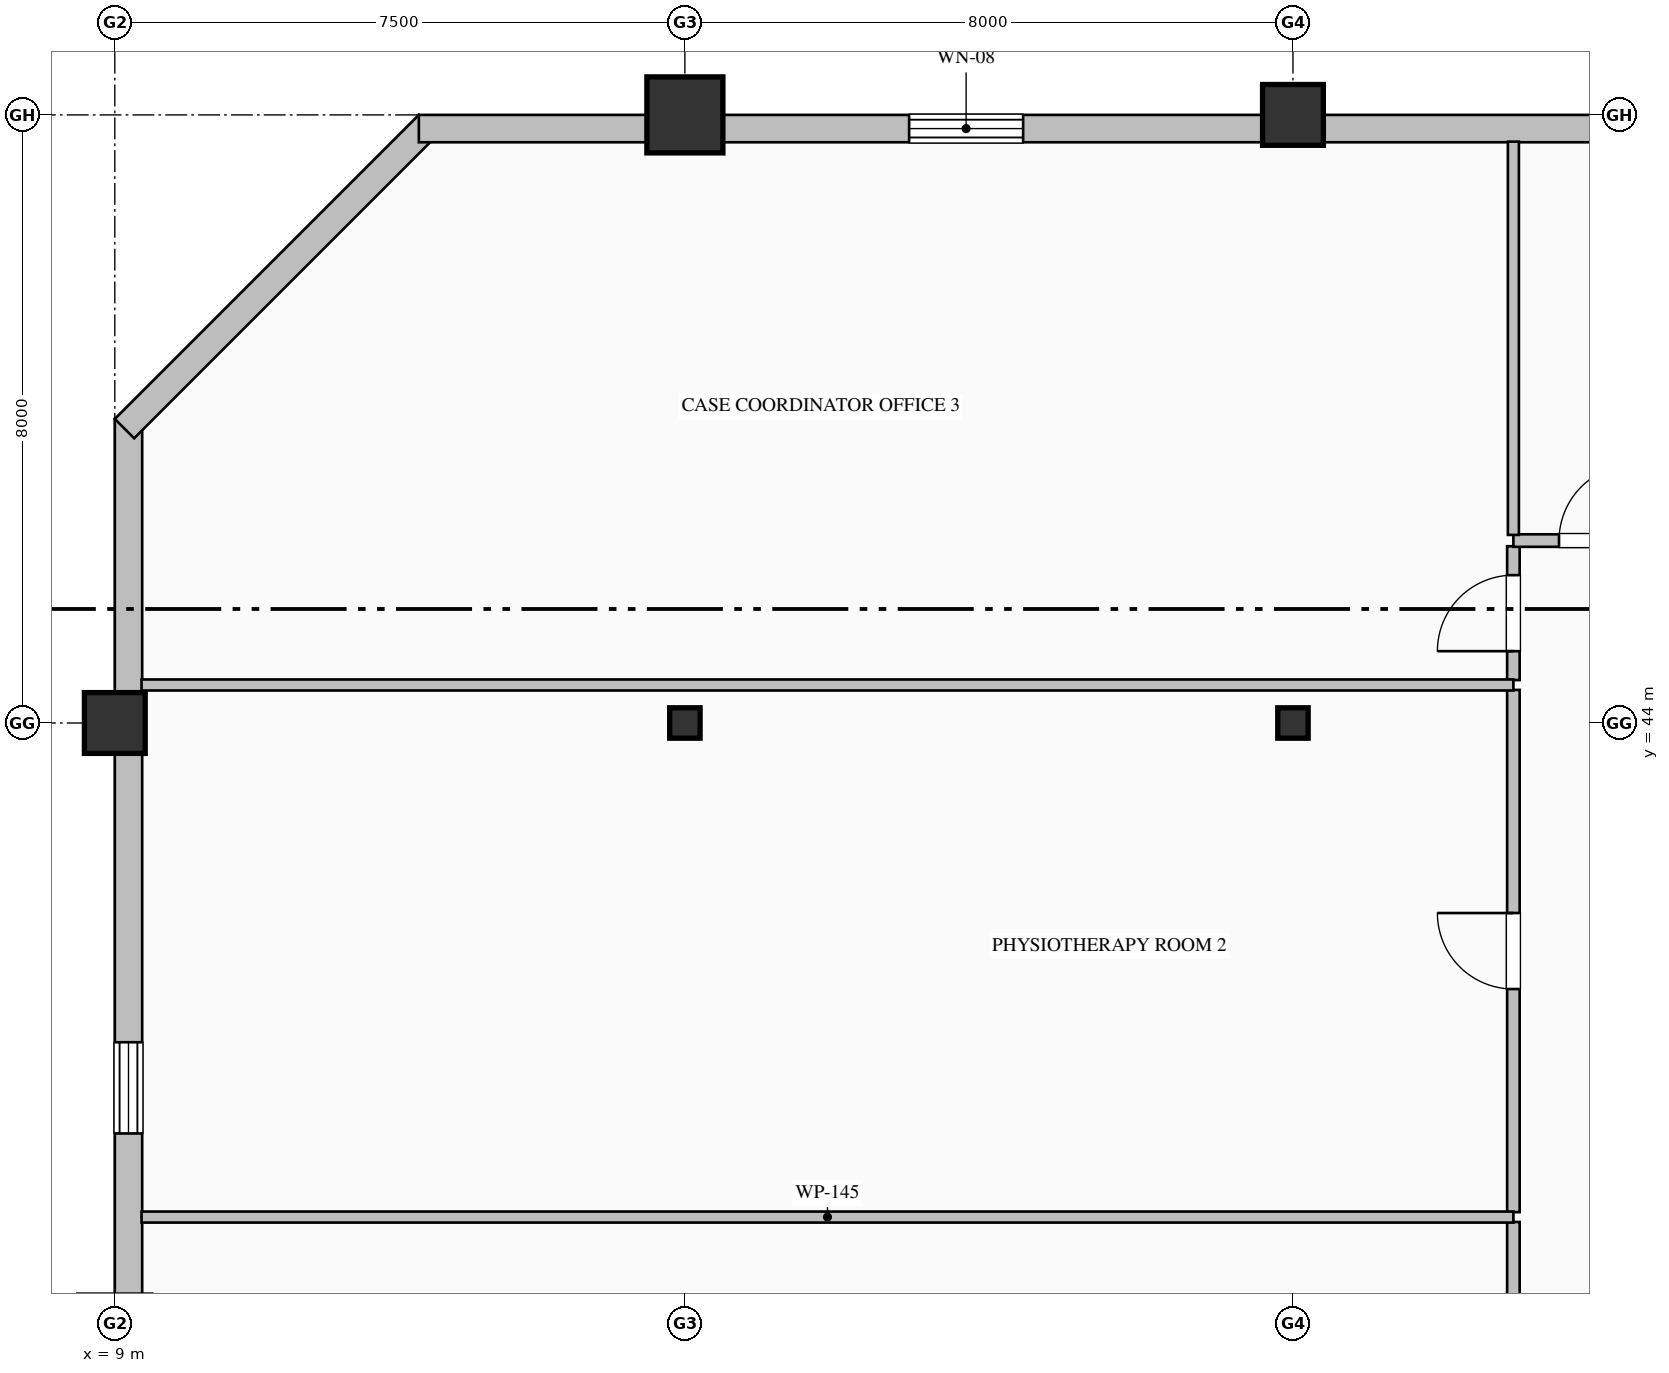
"""IFC4 building model, lengths in metres.
Left out: names, types, materials, properties, quantities, classifications, styles, units other than length and angle.
Written with IfcOpenShell. Run it as: python <this file> out.ifc"""

import sys

from ifc_helpers import new_model, si_unit, direction, frame, frame_2d, origin, origin_2d, place, context, subcontext, project, spatial, rectangle, hollow_rectangle, hollow_circle, i_section, extrude, element, fill, save


model = new_model("IFC4")
c1 = context("Model", 3, precision=1e-05, world=origin(), true_north=direction((0.0, 1.0)))
c2 = subcontext(c1, "Body", "Model", "MODEL_VIEW")
j1 = project(units=[si_unit("LENGTHUNIT", "METRE"), si_unit("PLANEANGLEUNIT", "RADIAN")], contexts=[c1])
p1 = place(None, origin())
s1 = spatial("IfcSite", under=j1, at=p1, CompositionType="ELEMENT")
p2 = place(p1, origin())
s2 = spatial("IfcBuilding", under=s1, at=p2, CompositionType="ELEMENT")
p3 = place(p2, frame((0.0, 0.0, 257.8)))
s3 = spatial("IfcBuildingStorey", under=s2, at=p3, CompositionType="ELEMENT", Elevation=257.8)
p4 = place(p3, frame((9.0, 44.0, 0.0), z_axis=(0.0, 0.0, 1.0), x_axis=(1.0, 0.0, 0.0)))
e1 = element("IfcColumn", 1, at=p4, inside=s3, PredefinedType="COLUMN", context=c2, shape_type="SweptSolid", body=[
    extrude(hollow_rectangle(XDim=0.8, YDim=0.8, WallThickness=0.032, at=origin_2d()), origin(), (0.0, 0.0, 1.0), 4.0),
])
p5 = place(p3, frame((16.5, 44.0, 0.0), z_axis=(0.0, 0.0, 1.0), x_axis=(1.0, 0.0, 0.0)))
e2 = element("IfcColumn", 2, at=p5, inside=s3, PredefinedType="COLUMN", context=c2, shape_type="SweptSolid", body=[
    extrude(i_section(OverallWidth=0.4, OverallDepth=0.4, WebThickness=0.013, FlangeThickness=0.021, FilletRadius=0.022, at=origin_2d()), origin(), (0.0, 0.0, 1.0), 4.0),
])
p6 = place(p3, frame((16.5, 52.0, 0.0), z_axis=(0.0, 0.0, 1.0), x_axis=(1.0, 0.0, 0.0)))
e3 = element("IfcColumn", 3, at=p6, inside=s3, PredefinedType="COLUMN", context=c2, shape_type="SweptSolid", body=[
    extrude(hollow_circle(Radius=0.5, WallThickness=0.036, at=origin_2d()), origin(), (0.0, 0.0, 1.0), 4.0),
])
p7 = place(p3, frame((24.5, 44.0, 0.0), z_axis=(0.0, 0.0, 1.0), x_axis=(1.0, 0.0, 0.0)))
e4 = element("IfcColumn", 4, at=p7, inside=s3, PredefinedType="COLUMN", context=c2, shape_type="SweptSolid", body=[
    extrude(i_section(OverallWidth=0.4, OverallDepth=0.4, WebThickness=0.013, FlangeThickness=0.021, FilletRadius=0.022, at=origin_2d()), origin(), (0.0, 0.0, 1.0), 4.0),
])
p8 = place(p3, frame((24.5, 52.0, 0.0), z_axis=(0.0, 0.0, 1.0), x_axis=(1.0, 0.0, 0.0)))
e5 = element("IfcColumn", 5, at=p8, inside=s3, PredefinedType="COLUMN", context=c2, shape_type="SweptSolid", body=[
    extrude(hollow_rectangle(XDim=0.8, YDim=0.8, WallThickness=0.032, at=origin_2d()), origin(), (0.0, 0.0, 1.0), 4.0),
])
p9 = place(p3, frame((9.18, 32.0, 0.0), z_axis=(0.0, 0.0, 1.0), x_axis=(0.0, 1.0, 0.0)))
e6 = element("IfcWall", 6, at=p9, inside=s3, PredefinedType="SOLIDWALL", context=c2, shape_type="SweptSolid", body=[
    extrude(rectangle(XDim=16.0, YDim=0.36, at=frame_2d((8.0, 0.0))), origin(), (0.0, 0.0, 1.0), 3.325),
])
p10 = place(p9, frame((6.6, 0.0, 0.9)))
e7 = element("IfcOpeningElement", 7, at=p10, cuts=e6, PredefinedType="OPENING", context=c2, shape_type="SweptSolid", body=[
    extrude(rectangle(XDim=1.2, YDim=1.85, at=frame_2d((0.6, 0.925))), frame((0.0, 0.19, 0.0), z_axis=(0.0, -1.0, 0.0), x_axis=(1.0, 0.0, 0.0)), (0.0, 0.0, 1.0), 0.38),
])
p11 = place(p3, frame((9.127, 47.873, 0.0), z_axis=(0.0, 0.0, 1.0), x_axis=(0.707106781187, 0.707106781187, 0.0)))
e8 = element("IfcWall", 8, at=p11, inside=s3, PredefinedType="SOLIDWALL", context=c2, shape_type="SweptSolid", body=[
    extrude(rectangle(XDim=5.657, YDim=0.36, at=frame_2d((2.828, 0.0))), origin(), (0.0, 0.0, 1.0), 3.775),
])
p12 = place(p3, frame((13.0, 51.82, 0.0), z_axis=(0.0, 0.0, 1.0), x_axis=(1.0, 0.0, 0.0)))
e9 = element("IfcWall", 9, at=p12, inside=s3, PredefinedType="SOLIDWALL", context=c2, shape_type="SweptSolid", body=[
    extrude(rectangle(XDim=27.52, YDim=0.36, at=frame_2d((13.76, 0.0))), origin(), (0.0, 0.0, 1.0), 3.325),
])
p13 = place(p12, frame((6.45, 0.0, 0.7)))
e10 = element("IfcOpeningElement", 10, at=p13, cuts=e9, PredefinedType="OPENING", context=c2, shape_type="SweptSolid", body=[
    extrude(rectangle(XDim=1.5, YDim=2.4, at=frame_2d((0.75, 1.2))), frame((0.0, 0.19, 0.0), z_axis=(0.0, -1.0, 0.0), x_axis=(1.0, 0.0, 0.0)), (0.0, 0.0, 1.0), 0.38),
])
p14 = place(p12, frame((17.25, 0.0, 0.7)))
e11 = element("IfcOpeningElement", 11, at=p14, cuts=e9, PredefinedType="OPENING", context=c2, shape_type="SweptSolid", body=[
    extrude(rectangle(XDim=1.5, YDim=2.4, at=frame_2d((0.75, 1.2))), frame((0.0, 0.19, 0.0), z_axis=(0.0, -1.0, 0.0), x_axis=(1.0, 0.0, 0.0)), (0.0, 0.0, 1.0), 0.38),
])
p15 = place(p3, frame((27.4, 32.675, 0.0), z_axis=(0.0, 0.0, 1.0), x_axis=(0.0, 1.0, 0.0)))
e12 = element("IfcWall", 12, at=p15, inside=s3, PredefinedType="PARTITIONING", context=c2, shape_type="SweptSolid", body=[
    extrude(rectangle(XDim=4.761, YDim=0.165, at=frame_2d((2.38, 0.0))), origin(), (0.0, 0.0, 1.0), 3.775),
])
p16 = place(p3, frame((27.4, 37.564, 0.0), z_axis=(0.0, 0.0, 1.0), x_axis=(0.0, 1.0, 0.0)))
e13 = element("IfcWall", 13, at=p16, inside=s3, PredefinedType="PARTITIONING", context=c2, shape_type="SweptSolid", body=[
    extrude(rectangle(XDim=6.871, YDim=0.165, at=frame_2d((3.436, 0.0))), origin(), (0.0, 0.0, 1.0), 3.775),
])
p17 = place(p16, frame((2.936, 0.0, 0.0)))
e14 = element("IfcOpeningElement", 14, at=p17, cuts=e13, PredefinedType="OPENING", context=c2, shape_type="SweptSolid", body=[
    extrude(rectangle(XDim=1.0, YDim=2.15, at=frame_2d((0.5, 1.075))), frame((0.0, 0.093, 0.0), z_axis=(0.0, -1.0, 0.0), x_axis=(1.0, 0.0, 0.0)), (0.0, 0.0, 1.0), 0.185),
])
p18 = place(p3, frame((27.4, 44.564, 0.0), z_axis=(0.0, 0.0, 1.0), x_axis=(0.0, 1.0, 0.0)))
e15 = element("IfcWall", 15, at=p18, inside=s3, PredefinedType="PARTITIONING", context=c2, shape_type="SweptSolid", body=[
    extrude(rectangle(XDim=1.761, YDim=0.165, at=frame_2d((0.88, 0.0))), origin(), (0.0, 0.0, 1.0), 3.775),
])
p19 = place(p18, frame((0.381, 0.0, 0.0)))
e16 = element("IfcOpeningElement", 16, at=p19, cuts=e15, PredefinedType="OPENING", context=c2, shape_type="SweptSolid", body=[
    extrude(rectangle(XDim=1.0, YDim=2.15, at=frame_2d((0.5, 1.075))), frame((0.0, 0.093, 0.0), z_axis=(0.0, -1.0, 0.0), x_axis=(1.0, 0.0, 0.0)), (0.0, 0.0, 1.0), 0.185),
])
p20 = place(p3, frame((27.4, 46.4, 0.0), z_axis=(0.0, 0.0, 1.0), x_axis=(1.0, 0.0, 0.0)))
e17 = element("IfcWall", 17, at=p20, inside=s3, PredefinedType="PARTITIONING", context=c2, shape_type="SweptSolid", body=[
    extrude(rectangle(XDim=2.2, YDim=0.165, at=frame_2d((1.1, 0.0))), origin(), (0.0, 0.0, 1.0), 3.775),
])
p21 = place(p20, frame((0.6, 0.0, 0.0)))
e18 = element("IfcOpeningElement", 18, at=p21, cuts=e17, PredefinedType="OPENING", context=c2, shape_type="SweptSolid", body=[
    extrude(rectangle(XDim=1.0, YDim=2.15, at=frame_2d((0.5, 1.075))), frame((0.0, 0.093, 0.0), z_axis=(0.0, -1.0, 0.0), x_axis=(1.0, 0.0, 0.0)), (0.0, 0.0, 1.0), 0.185),
])
for number, where, z_axis, x_axis in (
    (19, (9.352, 37.5, 0.0), (0.0, 0.0, 1.0), (1.0, 0.0, 0.0)),
    (20, (9.352, 44.5, 0.0), (0.0, 0.0, 1.0), (1.0, 0.0, 0.0)),
):
    element("IfcWall", number, at=place(p3, frame(where, z_axis=z_axis, x_axis=x_axis)), inside=s3, PredefinedType="PARTITIONING", context=c2, shape_type="SweptSolid", body=[
        extrude(rectangle(XDim=18.048, YDim=0.145, at=frame_2d((9.024, 0.0))), origin(), (0.0, 0.0, 1.0), 3.775),
    ])
p22 = place(p3, frame((27.4, 51.648, 0.0), z_axis=(0.0, 0.0, 1.0), x_axis=(0.0, -1.0, 0.0)))
e21 = element("IfcWall", 21, at=p22, inside=s3, PredefinedType="PARTITIONING", context=c2, shape_type="SweptSolid", body=[
    extrude(rectangle(XDim=5.173, YDim=0.145, at=frame_2d((2.587, 0.0))), origin(), (0.0, 0.0, 1.0), 3.775),
])
p23 = place(p10, origin())
e22 = element("IfcWindow", 22, at=p23, inside=s3, PartitioningType="DOUBLE_PANEL_VERTICAL", PredefinedType="WINDOW", context=c2, shape_type="SweptSolid", body=[
    extrude(rectangle(XDim=1.2, YDim=1.85, at=frame_2d((0.6, 0.925))), frame((0.0, 0.15, 0.0), z_axis=(0.0, -1.0, 0.0), x_axis=(1.0, 0.0, 0.0)), (0.0, 0.0, 1.0), 0.06),
])
fill(e7, e22)
p24 = place(p13, origin())
e23 = element("IfcWindow", 23, at=p24, inside=s3, PartitioningType="DOUBLE_PANEL_HORIZONTAL", PredefinedType="WINDOW", context=c2, shape_type="SweptSolid", body=[
    extrude(rectangle(XDim=1.5, YDim=2.4, at=frame_2d((0.75, 1.2))), frame((0.0, 0.15, 0.0), z_axis=(0.0, -1.0, 0.0), x_axis=(1.0, 0.0, 0.0)), (0.0, 0.0, 1.0), 0.06),
])
fill(e10, e23)
p25 = place(p17, origin())
e24 = element("IfcDoor", 24, at=p25, inside=s3, OperationType="SINGLE_SWING_RIGHT", PredefinedType="DOOR", context=c2, shape_type="SweptSolid", body=[
    extrude(rectangle(XDim=1.0, YDim=2.15, at=frame_2d((0.5, 1.075))), frame((0.0, 0.025, 0.0), z_axis=(0.0, -1.0, 0.0), x_axis=(1.0, 0.0, 0.0)), (0.0, 0.0, 1.0), 0.05),
])
fill(e14, e24)
p26 = place(p19, origin())
e25 = element("IfcDoor", 25, at=p26, inside=s3, OperationType="SINGLE_SWING_LEFT", PredefinedType="DOOR", context=c2, shape_type="SweptSolid", body=[
    extrude(rectangle(XDim=1.0, YDim=2.15, at=frame_2d((0.5, 1.075))), frame((0.0, 0.025, 0.0), z_axis=(0.0, -1.0, 0.0), x_axis=(1.0, 0.0, 0.0)), (0.0, 0.0, 1.0), 0.05),
])
fill(e16, e25)
p27 = place(p21, origin())
e26 = element("IfcDoor", 26, at=p27, inside=s3, OperationType="SINGLE_SWING_RIGHT", PredefinedType="DOOR", context=c2, shape_type="SweptSolid", body=[
    extrude(rectangle(XDim=1.0, YDim=2.15, at=frame_2d((0.5, 1.075))), frame((0.0, 0.025, 0.0), z_axis=(0.0, -1.0, 0.0), x_axis=(1.0, 0.0, 0.0)), (0.0, 0.0, 1.0), 0.05),
])
fill(e18, e26)
save(model, sys.argv[1])
